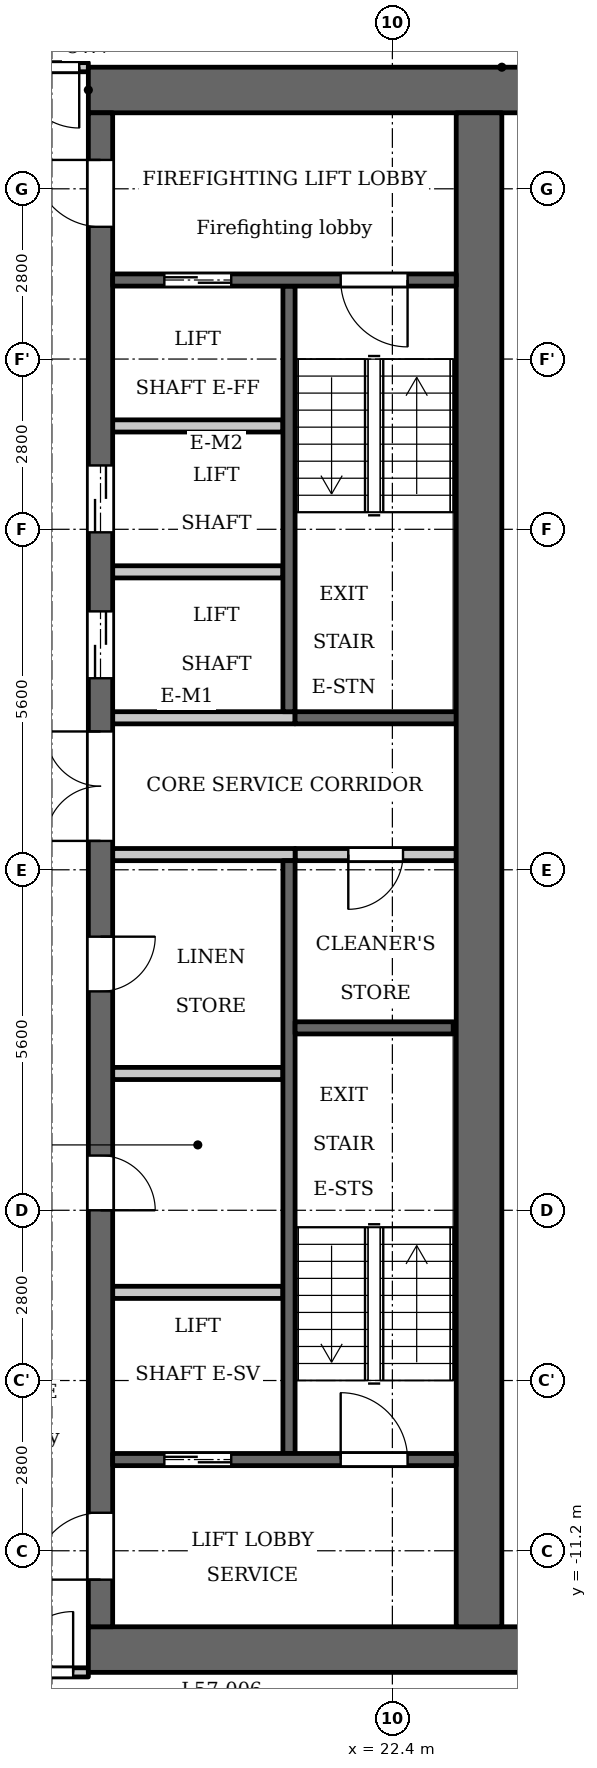
"""IFC4 building model, lengths in metres.
Left out: names, types, materials, properties, quantities, classifications, styles, units other than length and angle.
Written with IfcOpenShell. Run it as: python <this file> out.ifc"""

import sys

from ifc_helpers import new_model, si_unit, direction, frame, frame_2d, origin, place, context, subcontext, project, spatial, rectangle, extrude, element, fill, save


model = new_model("IFC4")
c1 = context("Model", 3, precision=1e-05, world=origin(), true_north=direction((0.0, 1.0)))
c2 = subcontext(c1, "Body", "Model", "MODEL_VIEW")
j1 = project(units=[si_unit("LENGTHUNIT", "METRE"), si_unit("PLANEANGLEUNIT", "RADIAN")], contexts=[c1])
p1 = place(None, origin())
s1 = spatial("IfcSite", under=j1, at=p1, CompositionType="ELEMENT")
p2 = place(p1, origin())
s2 = spatial("IfcBuilding", under=s1, at=p2, CompositionType="ELEMENT")
p3 = place(p2, frame((0.0, 0.0, 220.4)))
s3 = spatial("IfcBuildingStorey", under=s2, at=p3, CompositionType="ELEMENT", Elevation=220.4)
p4 = place(p3, frame((20.7, 2.6, 0.0), z_axis=(0.0, 0.0, 1.0), x_axis=(0.0, 1.0, 0.0)))
e1 = element("IfcWall", 1, at=p4, inside=s3, PredefinedType="SHEAR", context=c2, shape_type="SweptSolid", body=[
    extrude(rectangle(XDim=7.0, YDim=0.2, at=frame_2d((3.5, 0.0))), origin(), (0.0, 0.0, 1.0), 3.2),
])
p5 = place(p3, frame((20.7, -9.6, 0.0), z_axis=(0.0, 0.0, 1.0), x_axis=(0.0, 1.0, 0.0)))
e2 = element("IfcWall", 2, at=p5, inside=s3, PredefinedType="SHEAR", context=c2, shape_type="SweptSolid", body=[
    extrude(rectangle(XDim=9.75, YDim=0.2, at=frame_2d((4.875, 0.0))), origin(), (0.0, 0.0, 1.0), 3.2),
])
p6 = place(p3, frame((20.8, 2.5, 0.0), z_axis=(0.0, 0.0, 1.0), x_axis=(1.0, 0.0, 0.0)))
e3 = element("IfcWall", 3, at=p6, inside=s3, PredefinedType="SHEAR", context=c2, shape_type="SweptSolid", body=[
    extrude(rectangle(XDim=2.65, YDim=0.2, at=frame_2d((1.325, 0.0))), origin(), (0.0, 0.0, 1.0), 3.2),
])
p7 = place(p3, frame((20.8, 0.25, 0.0), z_axis=(0.0, 0.0, 1.0), x_axis=(1.0, 0.0, 0.0)))
e4 = element("IfcWall", 4, at=p7, inside=s3, PredefinedType="PARTITIONING", context=c2, shape_type="SweptSolid", body=[
    extrude(rectangle(XDim=2.65, YDim=0.2, at=frame_2d((1.325, 0.0))), origin(), (0.0, 0.0, 1.0), 3.2),
])
p8 = place(p7, frame((0.875, 0.0, 0.0)))
e5 = element("IfcOpeningElement", 5, at=p8, cuts=e4, PredefinedType="OPENING", context=c2, shape_type="SweptSolid", body=[
    extrude(rectangle(XDim=0.9, YDim=2.1, at=frame_2d((0.45, 1.05))), frame((0.0, 0.11, 0.0), z_axis=(0.0, -1.0, 0.0), x_axis=(1.0, 0.0, 0.0)), (0.0, 0.0, 1.0), 0.22),
])
for number, where, z_axis, x_axis in (
    (6, (17.4, 12.825, 0.0), (0.0, 0.0, 1.0), (1.0, 0.0, 0.0)),
    (7, (17.4, -12.825, 0.0), (0.0, 0.0, 1.0), (1.0, 0.0, 0.0)),
):
    element("IfcWall", number, at=place(p3, frame(where, z_axis=z_axis, x_axis=x_axis)), inside=s3, PredefinedType="SHEAR", context=c2, shape_type="SweptSolid", body=[
        extrude(rectangle(XDim=7.6, YDim=0.75, at=frame_2d((3.8, 0.0))), origin(), (0.0, 0.0, 1.0), 3.2),
    ])
p9 = place(p3, frame((17.8, -3.35, 0.0), z_axis=(0.0, 0.0, 1.0), x_axis=(1.0, 0.0, 0.0)))
e8 = element("IfcWall", 8, at=p9, inside=s3, PredefinedType="PARTITIONING", context=c2, shape_type="SweptSolid", body=[
    extrude(rectangle(XDim=2.8, YDim=0.2, at=frame_2d((1.4, 0.0))), origin(), (0.0, 0.0, 1.0), 3.2),
])
p10 = place(p3, frame((17.6, -12.45, 0.0), z_axis=(0.0, 0.0, 1.0), x_axis=(0.0, 1.0, 0.0)))
e9 = element("IfcWall", 9, at=p10, inside=s3, PredefinedType="SHEAR", context=c2, shape_type="SweptSolid", body=[
    extrude(rectangle(XDim=24.9, YDim=0.4, at=frame_2d((12.45, 0.0))), origin(), (0.0, 0.0, 1.0), 3.2),
])
p11 = place(p10, frame((6.85, 0.0, 0.0)))
e10 = element("IfcOpeningElement", 10, at=p11, cuts=e9, PredefinedType="OPENING", context=c2, shape_type="SweptSolid", body=[
    extrude(rectangle(XDim=0.9, YDim=2.1, at=frame_2d((0.45, 1.05))), frame((0.0, 0.21, 0.0), z_axis=(0.0, -1.0, 0.0), x_axis=(1.0, 0.0, 0.0)), (0.0, 0.0, 1.0), 0.42),
])
p12 = place(p10, frame((10.45, 0.0, 0.0)))
e11 = element("IfcOpeningElement", 11, at=p12, cuts=e9, PredefinedType="OPENING", context=c2, shape_type="SweptSolid", body=[
    extrude(rectangle(XDim=0.9, YDim=2.1, at=frame_2d((0.45, 1.05))), frame((0.0, 0.21, 0.0), z_axis=(0.0, -1.0, 0.0), x_axis=(1.0, 0.0, 0.0)), (0.0, 0.0, 1.0), 0.42),
])
p13 = place(p10, frame((15.6, 0.0, 0.0)))
e12 = element("IfcOpeningElement", 12, at=p13, cuts=e9, PredefinedType="OPENING", context=c2, shape_type="SweptSolid", body=[
    extrude(rectangle(XDim=1.1, YDim=2.1, at=frame_2d((0.55, 1.05))), frame((0.0, 0.21, 0.0), z_axis=(0.0, -1.0, 0.0), x_axis=(1.0, 0.0, 0.0)), (0.0, 0.0, 1.0), 0.42),
])
p14 = place(p10, frame((18.0, 0.0, 0.0)))
e13 = element("IfcOpeningElement", 13, at=p14, cuts=e9, PredefinedType="OPENING", context=c2, shape_type="SweptSolid", body=[
    extrude(rectangle(XDim=1.1, YDim=2.1, at=frame_2d((0.55, 1.05))), frame((0.0, 0.21, 0.0), z_axis=(0.0, -1.0, 0.0), x_axis=(1.0, 0.0, 0.0)), (0.0, 0.0, 1.0), 0.42),
])
p15 = place(p10, frame((23.025, 0.0, 0.0)))
e14 = element("IfcOpeningElement", 14, at=p15, cuts=e9, PredefinedType="OPENING", context=c2, shape_type="SweptSolid", body=[
    extrude(rectangle(XDim=1.1, YDim=2.1, at=frame_2d((0.55, 1.05))), frame((0.0, 0.21, 0.0), z_axis=(0.0, -1.0, 0.0), x_axis=(1.0, 0.0, 0.0)), (0.0, 0.0, 1.0), 0.42),
])
p16 = place(p10, frame((0.775, 0.0, 0.0)))
e15 = element("IfcOpeningElement", 15, at=p16, cuts=e9, PredefinedType="OPENING", context=c2, shape_type="SweptSolid", body=[
    extrude(rectangle(XDim=1.1, YDim=2.1, at=frame_2d((0.55, 1.05))), frame((0.0, 0.21, 0.0), z_axis=(0.0, -1.0, 0.0), x_axis=(1.0, 0.0, 0.0)), (0.0, 0.0, 1.0), 0.42),
])
p17 = place(p10, frame((12.925, 0.0, 0.0)))
e16 = element("IfcOpeningElement", 16, at=p17, cuts=e9, PredefinedType="OPENING", context=c2, shape_type="SweptSolid", body=[
    extrude(rectangle(XDim=1.8, YDim=2.1, at=frame_2d((0.9, 1.05))), frame((0.0, 0.21, 0.0), z_axis=(0.0, -1.0, 0.0), x_axis=(1.0, 0.0, 0.0)), (0.0, 0.0, 1.0), 0.42),
])
p18 = place(p3, frame((23.825, -12.45, 0.0), z_axis=(0.0, 0.0, 1.0), x_axis=(0.0, 1.0, 0.0)))
e17 = element("IfcWall", 17, at=p18, inside=s3, PredefinedType="SHEAR", context=c2, shape_type="SweptSolid", body=[
    extrude(rectangle(XDim=24.9, YDim=0.75, at=frame_2d((12.45, 0.0))), origin(), (0.0, 0.0, 1.0), 3.2),
])
p19 = place(p3, frame((17.8, -9.7, 0.0), z_axis=(0.0, 0.0, 1.0), x_axis=(1.0, 0.0, 0.0)))
e18 = element("IfcWall", 18, at=p19, inside=s3, PredefinedType="SHEAR", context=c2, shape_type="SweptSolid", body=[
    extrude(rectangle(XDim=5.65, YDim=0.2, at=frame_2d((2.825, 0.0))), origin(), (0.0, 0.0, 1.0), 3.2),
])
p20 = place(p19, frame((0.85, 0.0, 0.0)))
e19 = element("IfcOpeningElement", 19, at=p20, cuts=e18, PredefinedType="OPENING", context=c2, shape_type="SweptSolid", body=[
    extrude(rectangle(XDim=1.1, YDim=2.1, at=frame_2d((0.55, 1.05))), frame((0.0, 0.11, 0.0), z_axis=(0.0, -1.0, 0.0), x_axis=(1.0, 0.0, 0.0)), (0.0, 0.0, 1.0), 0.22),
])
p21 = place(p19, frame((3.75, 0.0, 0.0)))
e20 = element("IfcOpeningElement", 20, at=p21, cuts=e18, PredefinedType="OPENING", context=c2, shape_type="SweptSolid", body=[
    extrude(rectangle(XDim=1.1, YDim=2.1, at=frame_2d((0.55, 1.05))), frame((0.0, 0.11, 0.0), z_axis=(0.0, -1.0, 0.0), x_axis=(1.0, 0.0, 0.0)), (0.0, 0.0, 1.0), 0.22),
])
p22 = place(p3, frame((17.8, -6.95, 0.0), z_axis=(0.0, 0.0, 1.0), x_axis=(1.0, 0.0, 0.0)))
e21 = element("IfcWall", 21, at=p22, inside=s3, PredefinedType="PARTITIONING", context=c2, shape_type="SweptSolid", body=[
    extrude(rectangle(XDim=2.8, YDim=0.2, at=frame_2d((1.4, 0.0))), origin(), (0.0, 0.0, 1.0), 3.2),
])
for number, where, z_axis, x_axis in (
    (22, (17.8, 0.25, 0.0), (0.0, 0.0, 1.0), (1.0, 0.0, 0.0)),
    (23, (17.8, 2.5, 0.0), (0.0, 0.0, 1.0), (1.0, 0.0, 0.0)),
):
    element("IfcWall", number, at=place(p3, frame(where, z_axis=z_axis, x_axis=x_axis)), inside=s3, PredefinedType="PARTITIONING", context=c2, shape_type="SweptSolid", body=[
        extrude(rectangle(XDim=3.0, YDim=0.2, at=frame_2d((1.5, 0.0))), origin(), (0.0, 0.0, 1.0), 3.2),
    ])
for number, where, z_axis, x_axis in (
    (24, (17.8, 4.9, 0.0), (0.0, 0.0, 1.0), (1.0, 0.0, 0.0)),
    (25, (17.8, 7.3, 0.0), (0.0, 0.0, 1.0), (1.0, 0.0, 0.0)),
):
    element("IfcWall", number, at=place(p3, frame(where, z_axis=z_axis, x_axis=x_axis)), inside=s3, PredefinedType="PARTITIONING", context=c2, shape_type="SweptSolid", body=[
        extrude(rectangle(XDim=2.8, YDim=0.2, at=frame_2d((1.4, 0.0))), origin(), (0.0, 0.0, 1.0), 3.2),
    ])
p23 = place(p3, frame((17.8, 9.7, 0.0), z_axis=(0.0, 0.0, 1.0), x_axis=(1.0, 0.0, 0.0)))
e26 = element("IfcWall", 26, at=p23, inside=s3, PredefinedType="SHEAR", context=c2, shape_type="SweptSolid", body=[
    extrude(rectangle(XDim=5.65, YDim=0.2, at=frame_2d((2.825, 0.0))), origin(), (0.0, 0.0, 1.0), 3.2),
])
p24 = place(p23, frame((0.85, 0.0, 0.0)))
e27 = element("IfcOpeningElement", 27, at=p24, cuts=e26, PredefinedType="OPENING", context=c2, shape_type="SweptSolid", body=[
    extrude(rectangle(XDim=1.1, YDim=2.1, at=frame_2d((0.55, 1.05))), frame((0.0, 0.11, 0.0), z_axis=(0.0, -1.0, 0.0), x_axis=(1.0, 0.0, 0.0)), (0.0, 0.0, 1.0), 0.22),
])
p25 = place(p23, frame((3.75, 0.0, 0.0)))
e28 = element("IfcOpeningElement", 28, at=p25, cuts=e26, PredefinedType="OPENING", context=c2, shape_type="SweptSolid", body=[
    extrude(rectangle(XDim=1.1, YDim=2.1, at=frame_2d((0.55, 1.05))), frame((0.0, 0.11, 0.0), z_axis=(0.0, -1.0, 0.0), x_axis=(1.0, 0.0, 0.0)), (0.0, 0.0, 1.0), 0.22),
])
p26 = place(p3, frame((20.8, -2.6, 0.0), z_axis=(0.0, 0.0, 1.0), x_axis=(1.0, 0.0, 0.0)))
e29 = element("IfcWall", 29, at=p26, inside=s3, PredefinedType="SHEAR", context=c2, shape_type="SweptSolid", body=[
    extrude(rectangle(XDim=2.6, YDim=0.2, at=frame_2d((1.3, 0.0))), origin(), (0.0, 0.0, 1.0), 3.2),
])
p27 = place(p3, frame((-17.4, -13.2, 0.0), z_axis=(0.0, 0.0, 1.0), x_axis=(1.0, 0.0, 0.0)))
e30 = element("IfcWall", 30, at=p27, inside=s3, PredefinedType="PARTITIONING", context=c2, shape_type="SweptSolid", body=[
    extrude(rectangle(XDim=34.8, YDim=0.15, at=frame_2d((17.4, 0.0))), origin(), (0.0, 0.0, 1.0), 3.2),
])
p28 = place(p27, frame((0.15, 0.0, 0.0)))
e31 = element("IfcOpeningElement", 31, at=p28, cuts=e30, PredefinedType="OPENING", context=c2, shape_type="SweptSolid", body=[
    extrude(rectangle(XDim=1.0, YDim=2.1, at=frame_2d((0.5, 1.05))), frame((0.0, 0.085, 0.0), z_axis=(0.0, -1.0, 0.0), x_axis=(1.0, 0.0, 0.0)), (0.0, 0.0, 1.0), 0.17),
])
p29 = place(p27, frame((33.55, 0.0, 0.0)))
e32 = element("IfcOpeningElement", 32, at=p29, cuts=e30, PredefinedType="OPENING", context=c2, shape_type="SweptSolid", body=[
    extrude(rectangle(XDim=1.0, YDim=2.1, at=frame_2d((0.5, 1.05))), frame((0.0, 0.085, 0.0), z_axis=(0.0, -1.0, 0.0), x_axis=(1.0, 0.0, 0.0)), (0.0, 0.0, 1.0), 0.17),
])
p30 = place(p27, frame((3.7, 0.0, 0.0)))
e33 = element("IfcOpeningElement", 33, at=p30, cuts=e30, PredefinedType="OPENING", context=c2, shape_type="SweptSolid", body=[
    extrude(rectangle(XDim=1.0, YDim=2.1, at=frame_2d((0.5, 1.05))), frame((0.0, 0.085, 0.0), z_axis=(0.0, -1.0, 0.0), x_axis=(1.0, 0.0, 0.0)), (0.0, 0.0, 1.0), 0.17),
])
p31 = place(p27, frame((15.7, 0.0, 0.0)))
e34 = element("IfcOpeningElement", 34, at=p31, cuts=e30, PredefinedType="OPENING", context=c2, shape_type="SweptSolid", body=[
    extrude(rectangle(XDim=1.0, YDim=2.1, at=frame_2d((0.5, 1.05))), frame((0.0, 0.085, 0.0), z_axis=(0.0, -1.0, 0.0), x_axis=(1.0, 0.0, 0.0)), (0.0, 0.0, 1.0), 0.17),
])
p32 = place(p27, frame((21.3, 0.0, 0.0)))
e35 = element("IfcOpeningElement", 35, at=p32, cuts=e30, PredefinedType="OPENING", context=c2, shape_type="SweptSolid", body=[
    extrude(rectangle(XDim=1.0, YDim=2.1, at=frame_2d((0.5, 1.05))), frame((0.0, 0.085, 0.0), z_axis=(0.0, -1.0, 0.0), x_axis=(1.0, 0.0, 0.0)), (0.0, 0.0, 1.0), 0.17),
])
p33 = place(p27, frame((29.5, 0.0, 0.0)))
e36 = element("IfcOpeningElement", 36, at=p33, cuts=e30, PredefinedType="OPENING", context=c2, shape_type="SweptSolid", body=[
    extrude(rectangle(XDim=1.0, YDim=2.1, at=frame_2d((0.5, 1.05))), frame((0.0, 0.085, 0.0), z_axis=(0.0, -1.0, 0.0), x_axis=(1.0, 0.0, 0.0)), (0.0, 0.0, 1.0), 0.17),
])
p34 = place(p3, frame((-17.4, 13.2, 0.0), z_axis=(0.0, 0.0, 1.0), x_axis=(1.0, 0.0, 0.0)))
e37 = element("IfcWall", 37, at=p34, inside=s3, PredefinedType="PARTITIONING", context=c2, shape_type="SweptSolid", body=[
    extrude(rectangle(XDim=34.8, YDim=0.15, at=frame_2d((17.4, 0.0))), origin(), (0.0, 0.0, 1.0), 3.2),
])
p35 = place(p34, frame((0.25, 0.0, 0.0)))
e38 = element("IfcOpeningElement", 38, at=p35, cuts=e37, PredefinedType="OPENING", context=c2, shape_type="SweptSolid", body=[
    extrude(rectangle(XDim=1.0, YDim=2.1, at=frame_2d((0.5, 1.05))), frame((0.0, 0.085, 0.0), z_axis=(0.0, -1.0, 0.0), x_axis=(1.0, 0.0, 0.0)), (0.0, 0.0, 1.0), 0.17),
])
p36 = place(p34, frame((33.65, 0.0, 0.0)))
e39 = element("IfcOpeningElement", 39, at=p36, cuts=e37, PredefinedType="OPENING", context=c2, shape_type="SweptSolid", body=[
    extrude(rectangle(XDim=1.0, YDim=2.1, at=frame_2d((0.5, 1.05))), frame((0.0, 0.085, 0.0), z_axis=(0.0, -1.0, 0.0), x_axis=(1.0, 0.0, 0.0)), (0.0, 0.0, 1.0), 0.17),
])
p37 = place(p34, frame((15.75, 0.0, 0.0)))
e40 = element("IfcOpeningElement", 40, at=p37, cuts=e37, PredefinedType="OPENING", context=c2, shape_type="SweptSolid", body=[
    extrude(rectangle(XDim=1.0, YDim=2.1, at=frame_2d((0.5, 1.05))), frame((0.0, 0.085, 0.0), z_axis=(0.0, -1.0, 0.0), x_axis=(1.0, 0.0, 0.0)), (0.0, 0.0, 1.0), 0.17),
])
p38 = place(p34, frame((26.95, 0.0, 0.0)))
e41 = element("IfcOpeningElement", 41, at=p38, cuts=e37, PredefinedType="OPENING", context=c2, shape_type="SweptSolid", body=[
    extrude(rectangle(XDim=1.0, YDim=2.1, at=frame_2d((0.5, 1.05))), frame((0.0, 0.085, 0.0), z_axis=(0.0, -1.0, 0.0), x_axis=(1.0, 0.0, 0.0)), (0.0, 0.0, 1.0), 0.17),
])
p39 = place(p34, frame((29.75, 0.0, 0.0)))
e42 = element("IfcOpeningElement", 42, at=p39, cuts=e37, PredefinedType="OPENING", context=c2, shape_type="SweptSolid", body=[
    extrude(rectangle(XDim=1.0, YDim=2.1, at=frame_2d((0.5, 1.05))), frame((0.0, 0.085, 0.0), z_axis=(0.0, -1.0, 0.0), x_axis=(1.0, 0.0, 0.0)), (0.0, 0.0, 1.0), 0.17),
])
p40 = place(p20, origin())
e43 = element("IfcDoor", 43, at=p40, inside=s3, OperationType="DOUBLE_DOOR_SLIDING", PredefinedType="DOOR", context=c2, shape_type="SweptSolid", body=[
    extrude(rectangle(XDim=1.1, YDim=2.1, at=frame_2d((0.55, 1.05))), frame((0.0, 0.025, 0.0), z_axis=(0.0, -1.0, 0.0), x_axis=(1.0, 0.0, 0.0)), (0.0, 0.0, 1.0), 0.05),
])
fill(e19, e43)
p41 = place(p11, origin())
e44 = element("IfcDoor", 44, at=p41, inside=s3, OperationType="SINGLE_SWING_LEFT", PredefinedType="DOOR", context=c2, shape_type="SweptSolid", body=[
    extrude(rectangle(XDim=0.9, YDim=2.1, at=frame_2d((0.45, 1.05))), frame((0.0, 0.025, 0.0), z_axis=(0.0, -1.0, 0.0), x_axis=(1.0, 0.0, 0.0)), (0.0, 0.0, 1.0), 0.05),
])
fill(e10, e44)
p42 = place(p12, origin())
e45 = element("IfcDoor", 45, at=p42, inside=s3, OperationType="SINGLE_SWING_RIGHT", PredefinedType="DOOR", context=c2, shape_type="SweptSolid", body=[
    extrude(rectangle(XDim=0.9, YDim=2.1, at=frame_2d((0.45, 1.05))), frame((0.0, 0.025, 0.0), z_axis=(0.0, -1.0, 0.0), x_axis=(1.0, 0.0, 0.0)), (0.0, 0.0, 1.0), 0.05),
])
fill(e11, e45)
p43 = place(p13, origin())
e46 = element("IfcDoor", 46, at=p43, inside=s3, OperationType="DOUBLE_DOOR_SLIDING", PredefinedType="DOOR", context=c2, shape_type="SweptSolid", body=[
    extrude(rectangle(XDim=1.1, YDim=2.1, at=frame_2d((0.55, 1.05))), frame((0.0, 0.025, 0.0), z_axis=(0.0, -1.0, 0.0), x_axis=(1.0, 0.0, 0.0)), (0.0, 0.0, 1.0), 0.05),
])
fill(e12, e46)
p44 = place(p14, origin())
e47 = element("IfcDoor", 47, at=p44, inside=s3, OperationType="DOUBLE_DOOR_SLIDING", PredefinedType="DOOR", context=c2, shape_type="SweptSolid", body=[
    extrude(rectangle(XDim=1.1, YDim=2.1, at=frame_2d((0.55, 1.05))), frame((0.0, 0.025, 0.0), z_axis=(0.0, -1.0, 0.0), x_axis=(1.0, 0.0, 0.0)), (0.0, 0.0, 1.0), 0.05),
])
fill(e13, e47)
p45 = place(p24, origin())
e48 = element("IfcDoor", 48, at=p45, inside=s3, OperationType="DOUBLE_DOOR_SLIDING", PredefinedType="DOOR", context=c2, shape_type="SweptSolid", body=[
    extrude(rectangle(XDim=1.1, YDim=2.1, at=frame_2d((0.55, 1.05))), frame((0.0, 0.025, 0.0), z_axis=(0.0, -1.0, 0.0), x_axis=(1.0, 0.0, 0.0)), (0.0, 0.0, 1.0), 0.05),
])
fill(e27, e48)
p46 = place(p15, origin())
e49 = element("IfcDoor", 49, at=p46, inside=s3, OperationType="SINGLE_SWING_LEFT", PredefinedType="DOOR", context=c2, shape_type="SweptSolid", body=[
    extrude(rectangle(XDim=1.1, YDim=2.1, at=frame_2d((0.55, 1.05))), frame((0.0, 0.025, 0.0), z_axis=(0.0, -1.0, 0.0), x_axis=(1.0, 0.0, 0.0)), (0.0, 0.0, 1.0), 0.05),
])
fill(e14, e49)
p47 = place(p16, origin())
e50 = element("IfcDoor", 50, at=p47, inside=s3, OperationType="SINGLE_SWING_RIGHT", PredefinedType="DOOR", context=c2, shape_type="SweptSolid", body=[
    extrude(rectangle(XDim=1.1, YDim=2.1, at=frame_2d((0.55, 1.05))), frame((0.0, 0.025, 0.0), z_axis=(0.0, -1.0, 0.0), x_axis=(1.0, 0.0, 0.0)), (0.0, 0.0, 1.0), 0.05),
])
fill(e15, e50)
p48 = place(p25, origin())
e51 = element("IfcDoor", 51, at=p48, inside=s3, OperationType="SINGLE_SWING_RIGHT", PredefinedType="DOOR", context=c2, shape_type="SweptSolid", body=[
    extrude(rectangle(XDim=1.1, YDim=2.1, at=frame_2d((0.55, 1.05))), frame((0.0, 0.025, 0.0), z_axis=(0.0, -1.0, 0.0), x_axis=(1.0, 0.0, 0.0)), (0.0, 0.0, 1.0), 0.05),
])
fill(e28, e51)
p49 = place(p21, origin())
e52 = element("IfcDoor", 52, at=p49, inside=s3, OperationType="SINGLE_SWING_RIGHT", PredefinedType="DOOR", context=c2, shape_type="SweptSolid", body=[
    extrude(rectangle(XDim=1.1, YDim=2.1, at=frame_2d((0.55, 1.05))), frame((0.0, 0.025, 0.0), z_axis=(0.0, -1.0, 0.0), x_axis=(1.0, 0.0, 0.0)), (0.0, 0.0, 1.0), 0.05),
])
fill(e20, e52)
p50 = place(p17, origin())
e53 = element("IfcDoor", 53, at=p50, inside=s3, OperationType="DOUBLE_DOOR_SINGLE_SWING", PredefinedType="DOOR", context=c2, shape_type="SweptSolid", body=[
    extrude(rectangle(XDim=1.8, YDim=2.1, at=frame_2d((0.9, 1.05))), frame((0.0, 0.025, 0.0), z_axis=(0.0, -1.0, 0.0), x_axis=(1.0, 0.0, 0.0)), (0.0, 0.0, 1.0), 0.05),
])
fill(e16, e53)
p51 = place(p8, origin())
e54 = element("IfcDoor", 54, at=p51, inside=s3, OperationType="SINGLE_SWING_LEFT", PredefinedType="DOOR", context=c2, shape_type="SweptSolid", body=[
    extrude(rectangle(XDim=0.9, YDim=2.1, at=frame_2d((0.45, 1.05))), frame((0.0, 0.025, 0.0), z_axis=(0.0, -1.0, 0.0), x_axis=(1.0, 0.0, 0.0)), (0.0, 0.0, 1.0), 0.05),
])
fill(e5, e54)
p52 = place(p36, origin())
e55 = element("IfcDoor", 55, at=p52, inside=s3, OperationType="SINGLE_SWING_RIGHT", PredefinedType="DOOR", context=c2, shape_type="SweptSolid", body=[
    extrude(rectangle(XDim=1.0, YDim=2.1, at=frame_2d((0.5, 1.05))), frame((0.0, 0.025, 0.0), z_axis=(0.0, -1.0, 0.0), x_axis=(1.0, 0.0, 0.0)), (0.0, 0.0, 1.0), 0.05),
])
fill(e39, e55)
p53 = place(p29, origin())
e56 = element("IfcDoor", 56, at=p53, inside=s3, OperationType="SINGLE_SWING_LEFT", PredefinedType="DOOR", context=c2, shape_type="SweptSolid", body=[
    extrude(rectangle(XDim=1.0, YDim=2.1, at=frame_2d((0.5, 1.05))), frame((0.0, 0.025, 0.0), z_axis=(0.0, -1.0, 0.0), x_axis=(1.0, 0.0, 0.0)), (0.0, 0.0, 1.0), 0.05),
])
fill(e32, e56)
save(model, sys.argv[1])
